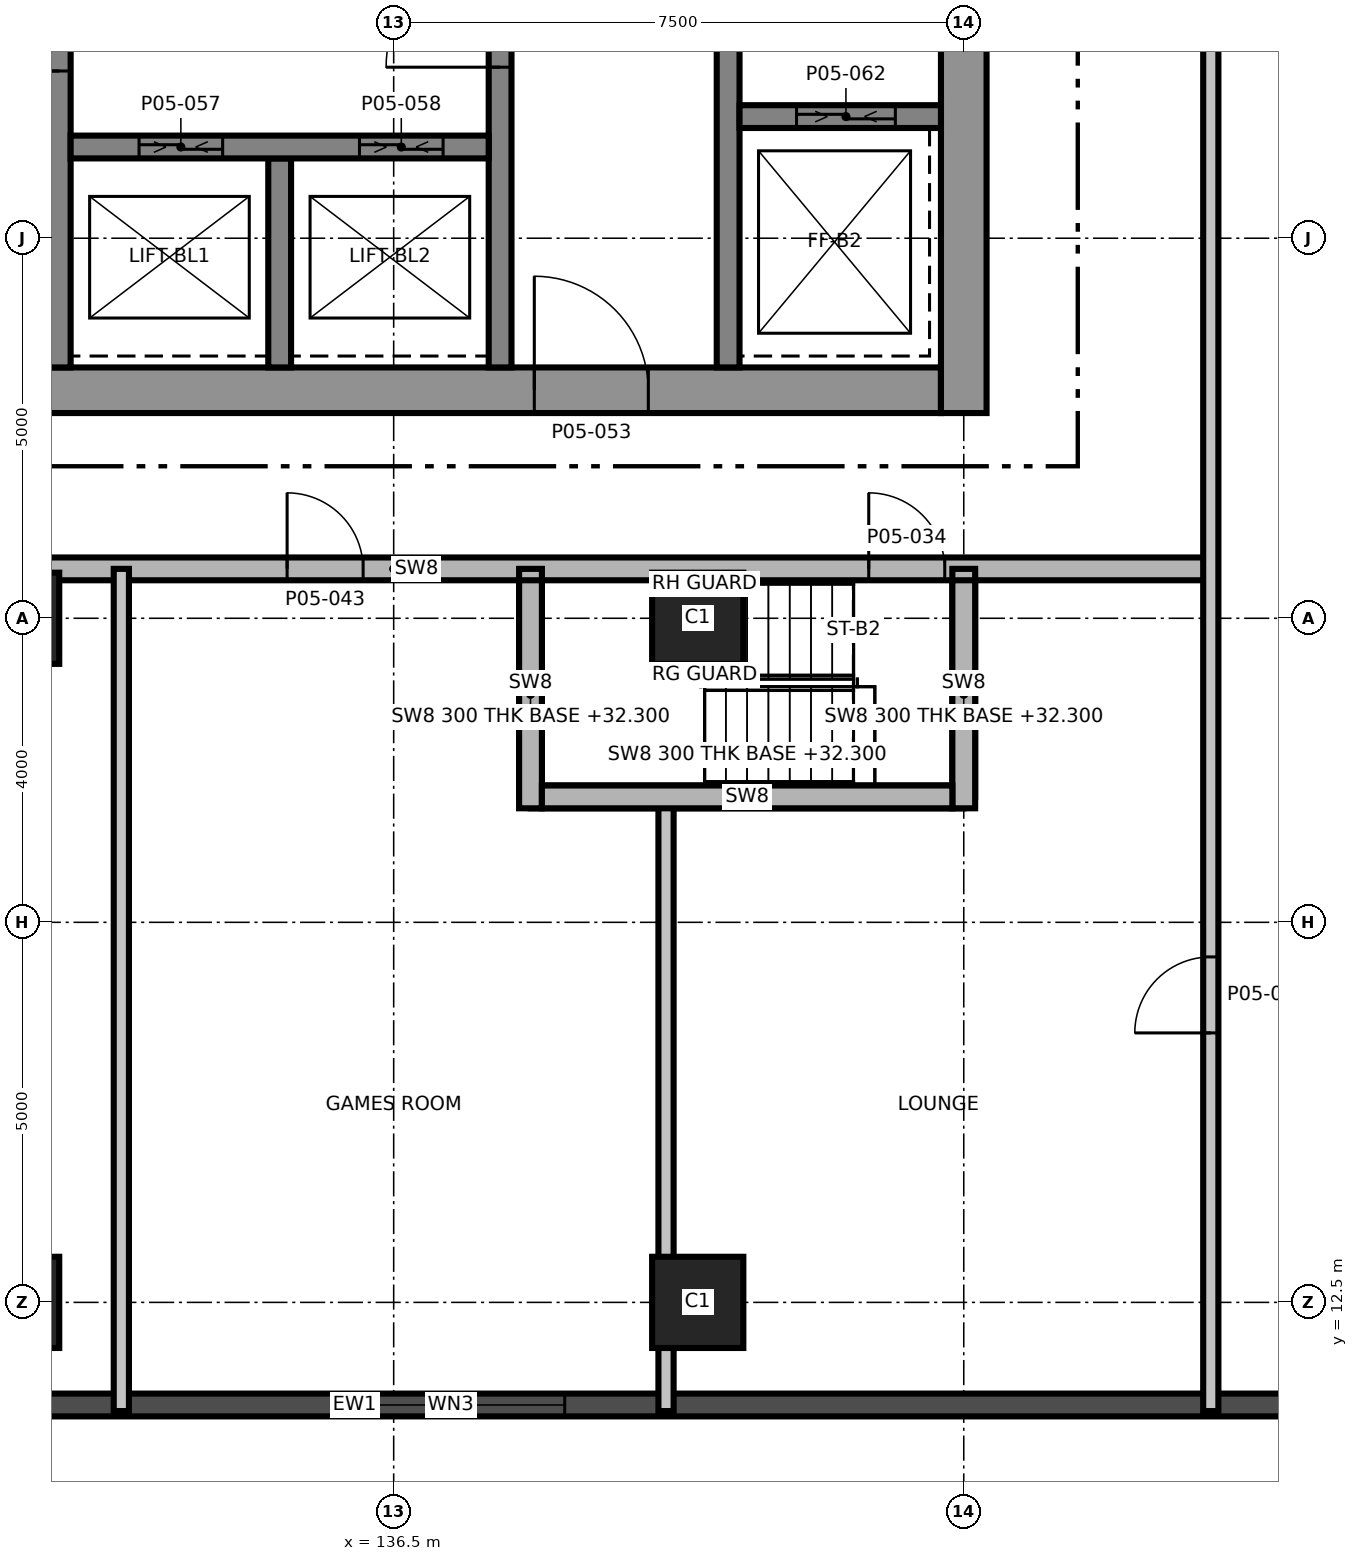
"""IFC4 building model, lengths in metres.
Left out: names, types, materials, properties, quantities, classifications, styles, units other than length and angle.
Written with IfcOpenShell. Run it as: python <this file> out.ifc"""

import sys

from ifc_helpers import new_model, si_unit, direction, frame, frame_2d, origin, origin_2d, place, context, subcontext, project, spatial, rectangle, extrude, element, fill, save


model = new_model("IFC4")
c1 = context("Model", 3, precision=1e-05, world=origin(), true_north=direction((0.0, 1.0)))
c2 = subcontext(c1, "Body", "Model", "MODEL_VIEW")
j1 = project(units=[si_unit("LENGTHUNIT", "METRE"), si_unit("PLANEANGLEUNIT", "RADIAN")], contexts=[c1])
p1 = place(None, origin())
s1 = spatial("IfcSite", under=j1, at=p1, CompositionType="ELEMENT")
p2 = place(p1, origin())
s2 = spatial("IfcBuilding", under=s1, at=p2, CompositionType="ELEMENT")
p3 = place(p2, frame((0.0, 0.0, 28.5)))
s3 = spatial("IfcBuildingStorey", under=s2, at=p3, CompositionType="ELEMENT", Elevation=28.5)
p4 = place(p3, frame((128.7, 24.5, 0.0), z_axis=(0.0, 0.0, 1.0), x_axis=(1.0, 0.0, 0.0)))
e1 = element("IfcWall", 1, at=p4, inside=s3, PredefinedType="SHEAR", context=c2, shape_type="SweptSolid", body=[
    extrude(rectangle(XDim=15.0, YDim=0.6, at=frame_2d((7.5, 0.0))), origin(), (0.0, 0.0, 1.0), 5.0),
])
p5 = place(p4, frame((9.65, 0.0, 0.0)))
e2 = element("IfcOpeningElement", 2, at=p5, cuts=e1, PredefinedType="OPENING", context=c2, shape_type="SweptSolid", body=[
    extrude(rectangle(XDim=1.5, YDim=2.1, at=frame_2d((0.75, 1.05))), frame((0.0, 0.31, 0.0), z_axis=(0.0, -1.0, 0.0), x_axis=(1.0, 0.0, 0.0)), (0.0, 0.0, 1.0), 0.62),
])
p6 = place(p4, frame((1.25, 0.0, 0.0)))
e3 = element("IfcOpeningElement", 3, at=p6, cuts=e1, PredefinedType="OPENING", context=c2, shape_type="SweptSolid", body=[
    extrude(rectangle(XDim=0.9, YDim=2.1, at=frame_2d((0.45, 1.05))), frame((0.0, 0.31, 0.0), z_axis=(0.0, -1.0, 0.0), x_axis=(1.0, 0.0, 0.0)), (0.0, 0.0, 1.0), 0.62),
])
p7 = place(p3, frame((144.0, 24.2, 0.0), z_axis=(0.0, 0.0, 1.0), x_axis=(0.0, 1.0, 0.0)))
e4 = element("IfcWall", 4, at=p7, inside=s3, PredefinedType="SHEAR", context=c2, shape_type="SweptSolid", body=[
    extrude(rectangle(XDim=13.6, YDim=0.6, at=frame_2d((6.8, 0.0))), origin(), (0.0, 0.0, 1.0), 5.0),
])
p8 = place(p3, frame((132.1, 24.8, 0.0), z_axis=(0.0, 0.0, 1.0), x_axis=(0.0, 1.0, 0.0)))
e5 = element("IfcWall", 5, at=p8, inside=s3, PredefinedType="SHEAR", context=c2, shape_type="SweptSolid", body=[
    extrude(rectangle(XDim=12.4, YDim=0.3, at=frame_2d((6.2, 0.0))), origin(), (0.0, 0.0, 1.0), 5.0),
])
p9 = place(p8, frame((3.9, 0.0, 0.0)))
e6 = element("IfcOpeningElement", 6, at=p9, cuts=e5, PredefinedType="OPENING", context=c2, shape_type="SweptSolid", body=[
    extrude(rectangle(XDim=1.2, YDim=2.1, at=frame_2d((0.6, 1.05))), frame((0.0, 0.16, 0.0), z_axis=(0.0, -1.0, 0.0), x_axis=(1.0, 0.0, 0.0)), (0.0, 0.0, 1.0), 0.32),
])
p10 = place(p3, frame((137.9, 24.8, 0.0), z_axis=(0.0, 0.0, 1.0), x_axis=(0.0, 1.0, 0.0)))
e7 = element("IfcWall", 7, at=p10, inside=s3, PredefinedType="SHEAR", context=c2, shape_type="SweptSolid", body=[
    extrude(rectangle(XDim=12.4, YDim=0.3, at=frame_2d((6.2, 0.0))), origin(), (0.0, 0.0, 1.0), 5.0),
])
p11 = place(p10, frame((3.95, 0.0, 0.0)))
e8 = element("IfcOpeningElement", 8, at=p11, cuts=e7, PredefinedType="OPENING", context=c2, shape_type="SweptSolid", body=[
    extrude(rectangle(XDim=1.5, YDim=2.1, at=frame_2d((0.75, 1.05))), frame((0.0, 0.16, 0.0), z_axis=(0.0, -1.0, 0.0), x_axis=(1.0, 0.0, 0.0)), (0.0, 0.0, 1.0), 0.32),
])
p12 = place(p10, frame((10.45, 0.0, 0.0)))
e9 = element("IfcOpeningElement", 9, at=p12, cuts=e7, PredefinedType="OPENING", context=c2, shape_type="SweptSolid", body=[
    extrude(rectangle(XDim=0.9, YDim=2.1, at=frame_2d((0.45, 1.05))), frame((0.0, 0.16, 0.0), z_axis=(0.0, -1.0, 0.0), x_axis=(1.0, 0.0, 0.0)), (0.0, 0.0, 1.0), 0.32),
])
p13 = place(p3, frame((140.9, 24.8, 0.0), z_axis=(0.0, 0.0, 1.0), x_axis=(0.0, 1.0, 0.0)))
e10 = element("IfcWall", 10, at=p13, inside=s3, PredefinedType="SHEAR", context=c2, shape_type="SweptSolid", body=[
    extrude(rectangle(XDim=12.4, YDim=0.3, at=frame_2d((6.2, 0.0))), origin(), (0.0, 0.0, 1.0), 5.0),
])
p14 = place(p13, frame((5.9, 0.0, 0.0)))
e11 = element("IfcOpeningElement", 11, at=p14, cuts=e10, PredefinedType="OPENING", context=c2, shape_type="SweptSolid", body=[
    extrude(rectangle(XDim=1.2, YDim=2.1, at=frame_2d((0.6, 1.05))), frame((0.0, 0.16, 0.0), z_axis=(0.0, -1.0, 0.0), x_axis=(1.0, 0.0, 0.0)), (0.0, 0.0, 1.0), 0.32),
])
p15 = place(p3, frame((135.0, 24.8, 0.0), z_axis=(0.0, 0.0, 1.0), x_axis=(0.0, 1.0, 0.0)))
e12 = element("IfcWall", 12, at=p15, inside=s3, PredefinedType="SHEAR", context=c2, shape_type="SweptSolid", body=[
    extrude(rectangle(XDim=2.75, YDim=0.3, at=frame_2d((1.375, 0.0))), origin(), (0.0, 0.0, 1.0), 5.0),
])
p16 = place(p3, frame((132.25, 27.7, 0.0), z_axis=(0.0, 0.0, 1.0), x_axis=(1.0, 0.0, 0.0)))
e13 = element("IfcWall", 13, at=p16, inside=s3, PredefinedType="SHEAR", context=c2, shape_type="SweptSolid", body=[
    extrude(rectangle(XDim=5.5, YDim=0.3, at=frame_2d((2.75, 0.0))), origin(), (0.0, 0.0, 1.0), 5.0),
])
p17 = place(p16, frame((0.9, 0.0, 0.0)))
e14 = element("IfcOpeningElement", 14, at=p17, cuts=e13, PredefinedType="OPENING", context=c2, shape_type="SweptSolid", body=[
    extrude(rectangle(XDim=1.1, YDim=2.4, at=frame_2d((0.55, 1.2))), frame((0.0, 0.16, 0.0), z_axis=(0.0, -1.0, 0.0), x_axis=(1.0, 0.0, 0.0)), (0.0, 0.0, 1.0), 0.32),
])
p18 = place(p16, frame((3.8, 0.0, 0.0)))
e15 = element("IfcOpeningElement", 15, at=p18, cuts=e13, PredefinedType="OPENING", context=c2, shape_type="SweptSolid", body=[
    extrude(rectangle(XDim=1.1, YDim=2.4, at=frame_2d((0.55, 1.2))), frame((0.0, 0.16, 0.0), z_axis=(0.0, -1.0, 0.0), x_axis=(1.0, 0.0, 0.0)), (0.0, 0.0, 1.0), 0.32),
])
p19 = place(p3, frame((141.05, 28.1, 0.0), z_axis=(0.0, 0.0, 1.0), x_axis=(1.0, 0.0, 0.0)))
e16 = element("IfcWall", 16, at=p19, inside=s3, PredefinedType="SHEAR", context=c2, shape_type="SweptSolid", body=[
    extrude(rectangle(XDim=2.65, YDim=0.3, at=frame_2d((1.325, 0.0))), origin(), (0.0, 0.0, 1.0), 5.0),
])
p20 = place(p19, frame((0.75, 0.0, 0.0)))
e17 = element("IfcOpeningElement", 17, at=p20, cuts=e16, PredefinedType="OPENING", context=c2, shape_type="SweptSolid", body=[
    extrude(rectangle(XDim=1.3, YDim=2.4, at=frame_2d((0.65, 1.2))), frame((0.0, 0.16, 0.0), z_axis=(0.0, -1.0, 0.0), x_axis=(1.0, 0.0, 0.0)), (0.0, 0.0, 1.0), 0.32),
])
for number, where, z_axis, x_axis in (
    (18, (131.5, 12.5, 0.0), (0.0, 0.0, 1.0), (1.0, 0.0, 0.0)),
    (19, (140.5, 12.5, 0.0), (0.0, 0.0, 1.0), (1.0, 0.0, 0.0)),
    (20, (131.5, 21.5, 0.0), (0.0, 0.0, 1.0), (1.0, 0.0, 0.0)),
    (21, (140.5, 21.5, 0.0), (0.0, 0.0, 1.0), (1.0, 0.0, 0.0)),
):
    element("IfcColumn", number, at=place(p3, frame(where, z_axis=z_axis, x_axis=x_axis)), inside=s3, PredefinedType="COLUMN", context=c2, shape_type="SweptSolid", body=[
        extrude(rectangle(XDim=1.2, YDim=1.2, at=origin_2d()), origin(), (0.0, 0.0, 1.0), 5.0),
    ])
p21 = place(p3, frame((118.048, 11.15, 0.0), z_axis=(0.0, 0.0, 1.0), x_axis=(1.0, 0.0, 0.0)))
e22 = element("IfcWall", 22, at=p21, inside=s3, PredefinedType="SOLIDWALL", context=c2, shape_type="SweptSolid", body=[
    extrude(rectangle(XDim=35.88, YDim=0.3, at=frame_2d((17.94, 0.0))), origin(), (0.0, 0.0, 1.0), 4.7),
])
p22 = place(p21, frame((4.202, 0.0, 0.9)))
e23 = element("IfcOpeningElement", 23, at=p22, cuts=e22, PredefinedType="OPENING", context=c2, shape_type="SweptSolid", body=[
    extrude(rectangle(XDim=3.0, YDim=2.4, at=frame_2d((1.5, 1.2))), frame((0.0, 0.16, 0.0), z_axis=(0.0, -1.0, 0.0), x_axis=(1.0, 0.0, 0.0)), (0.0, 0.0, 1.0), 0.32),
])
p23 = place(p21, frame((8.702, 0.0, 0.9)))
e24 = element("IfcOpeningElement", 24, at=p23, cuts=e22, PredefinedType="OPENING", context=c2, shape_type="SweptSolid", body=[
    extrude(rectangle(XDim=3.0, YDim=2.4, at=frame_2d((1.5, 1.2))), frame((0.0, 0.16, 0.0), z_axis=(0.0, -1.0, 0.0), x_axis=(1.0, 0.0, 0.0)), (0.0, 0.0, 1.0), 0.32),
])
p24 = place(p21, frame((17.702, 0.0, 0.9)))
e25 = element("IfcOpeningElement", 25, at=p24, cuts=e22, PredefinedType="OPENING", context=c2, shape_type="SweptSolid", body=[
    extrude(rectangle(XDim=3.0, YDim=2.4, at=frame_2d((1.5, 1.2))), frame((0.0, 0.16, 0.0), z_axis=(0.0, -1.0, 0.0), x_axis=(1.0, 0.0, 0.0)), (0.0, 0.0, 1.0), 0.32),
])
p25 = place(p21, frame((31.726, 0.0, 0.9)))
e26 = element("IfcOpeningElement", 26, at=p25, cuts=e22, PredefinedType="OPENING", context=c2, shape_type="SweptSolid", body=[
    extrude(rectangle(XDim=3.0, YDim=2.4, at=frame_2d((1.5, 1.2))), frame((0.0, 0.16, 0.0), z_axis=(0.0, -1.0, 0.0), x_axis=(1.0, 0.0, 0.0)), (0.0, 0.0, 1.0), 0.32),
])
p26 = place(p3, frame((138.3, 19.15, 0.0), z_axis=(0.0, 0.0, 1.0), x_axis=(1.0, 0.0, 0.0)))
e27 = element("IfcWall", 27, at=p26, inside=s3, PredefinedType="SHEAR", context=c2, shape_type="SweptSolid", body=[
    extrude(rectangle(XDim=5.7, YDim=0.3, at=frame_2d((2.85, 0.0))), origin(), (0.0, 0.0, 1.0), 3.8),
])
p27 = place(p3, frame((125.75, 22.15, 0.0), z_axis=(0.0, 0.0, 1.0), x_axis=(1.0, 0.0, 0.0)))
e28 = element("IfcWall", 28, at=p27, inside=s3, PredefinedType="SHEAR", context=c2, shape_type="SweptSolid", body=[
    extrude(rectangle(XDim=21.5, YDim=0.3, at=frame_2d((10.75, 0.0))), origin(), (0.0, 0.0, 1.0), 3.8),
])
p28 = place(p27, frame((17.0, 0.0, 0.0)))
e29 = element("IfcOpeningElement", 29, at=p28, cuts=e28, PredefinedType="OPENING", context=c2, shape_type="SweptSolid", body=[
    extrude(rectangle(XDim=1.0, YDim=2.1, at=frame_2d((0.5, 1.05))), frame((0.0, 0.16, 0.0), z_axis=(0.0, -1.0, 0.0), x_axis=(1.0, 0.0, 0.0)), (0.0, 0.0, 1.0), 0.32),
])
p29 = place(p27, frame((3.064, 0.0, 0.0)))
e30 = element("IfcOpeningElement", 30, at=p29, cuts=e28, PredefinedType="OPENING", context=c2, shape_type="SweptSolid", body=[
    extrude(rectangle(XDim=1.0, YDim=2.1, at=frame_2d((0.5, 1.05))), frame((0.0, 0.16, 0.0), z_axis=(0.0, -1.0, 0.0), x_axis=(1.0, 0.0, 0.0)), (0.0, 0.0, 1.0), 0.32),
])
p30 = place(p27, frame((9.348, 0.0, 0.0)))
e31 = element("IfcOpeningElement", 31, at=p30, cuts=e28, PredefinedType="OPENING", context=c2, shape_type="SweptSolid", body=[
    extrude(rectangle(XDim=1.0, YDim=2.1, at=frame_2d((0.5, 1.05))), frame((0.0, 0.16, 0.0), z_axis=(0.0, -1.0, 0.0), x_axis=(1.0, 0.0, 0.0)), (0.0, 0.0, 1.0), 0.32),
])
p31 = place(p3, frame((132.917, 11.07, 0.0), z_axis=(0.0, 0.0, 1.0), x_axis=(0.0, 1.0, 0.0)))
e32 = element("IfcWall", 32, at=p31, inside=s3, PredefinedType="PARTITIONING", context=c2, shape_type="SweptSolid", body=[
    extrude(rectangle(XDim=11.08, YDim=0.2, at=frame_2d((5.54, 0.0))), origin(), (0.0, 0.0, 1.0), 3.8),
])
p32 = place(p3, frame((138.3, 19.15, 0.0), z_axis=(0.0, 0.0, 1.0), x_axis=(0.0, 1.0, 0.0)))
e33 = element("IfcWall", 33, at=p32, inside=s3, PredefinedType="SHEAR", context=c2, shape_type="SweptSolid", body=[
    extrude(rectangle(XDim=3.0, YDim=0.3, at=frame_2d((1.5, 0.0))), origin(), (0.0, 0.0, 1.0), 3.8),
])
p33 = place(p3, frame((140.083, 11.07, 0.0), z_axis=(0.0, 0.0, 1.0), x_axis=(0.0, 1.0, 0.0)))
e34 = element("IfcWall", 34, at=p33, inside=s3, PredefinedType="PARTITIONING", context=c2, shape_type="SweptSolid", body=[
    extrude(rectangle(XDim=8.08, YDim=0.2, at=frame_2d((4.04, 0.0))), origin(), (0.0, 0.0, 1.0), 3.8),
])
p34 = place(p3, frame((144.0, 19.15, 0.0), z_axis=(0.0, 0.0, 1.0), x_axis=(0.0, 1.0, 0.0)))
e35 = element("IfcWall", 35, at=p34, inside=s3, PredefinedType="SHEAR", context=c2, shape_type="SweptSolid", body=[
    extrude(rectangle(XDim=3.0, YDim=0.3, at=frame_2d((1.5, 0.0))), origin(), (0.0, 0.0, 1.0), 3.8),
])
p35 = place(p3, frame((147.25, 11.07, 0.0), z_axis=(0.0, 0.0, 1.0), x_axis=(0.0, 1.0, 0.0)))
e36 = element("IfcWall", 36, at=p35, inside=s3, PredefinedType="PARTITIONING", context=c2, shape_type="SweptSolid", body=[
    extrude(rectangle(XDim=38.86, YDim=0.2, at=frame_2d((19.43, 0.0))), origin(), (0.0, 0.0, 1.0), 3.8),
])
p36 = place(p35, frame((18.18, 0.0, 0.0)))
e37 = element("IfcOpeningElement", 37, at=p36, cuts=e36, PredefinedType="OPENING", context=c2, shape_type="SweptSolid", body=[
    extrude(rectangle(XDim=1.5, YDim=2.1, at=frame_2d((0.75, 1.05))), frame((0.0, 0.11, 0.0), z_axis=(0.0, -1.0, 0.0), x_axis=(1.0, 0.0, 0.0)), (0.0, 0.0, 1.0), 0.22),
])
p37 = place(p35, frame((4.975, 0.0, 0.0)))
e38 = element("IfcOpeningElement", 38, at=p37, cuts=e36, PredefinedType="OPENING", context=c2, shape_type="SweptSolid", body=[
    extrude(rectangle(XDim=1.0, YDim=2.1, at=frame_2d((0.5, 1.05))), frame((0.0, 0.11, 0.0), z_axis=(0.0, -1.0, 0.0), x_axis=(1.0, 0.0, 0.0)), (0.0, 0.0, 1.0), 0.22),
])
for number, where, z_axis, x_axis in (
    (39, (138.3, 19.0, 3.8), (0.0, 0.0, 1.0), (0.0, 1.0, 0.0)),
    (40, (144.0, 19.0, 3.8), (0.0, 0.0, 1.0), (0.0, 1.0, 0.0)),
):
    element("IfcWall", number, at=place(p3, frame(where, z_axis=z_axis, x_axis=x_axis)), inside=s3, PredefinedType="SHEAR", context=c2, shape_type="SweptSolid", body=[
        extrude(rectangle(XDim=3.0, YDim=0.3, at=frame_2d((1.5, 0.0))), origin(), (0.0, 0.0, 1.0), 0.9),
    ])
p38 = place(p3, frame((138.45, 19.15, 3.8), z_axis=(0.0, 0.0, 1.0), x_axis=(1.0, 0.0, 0.0)))
e41 = element("IfcWall", 41, at=p38, inside=s3, PredefinedType="SHEAR", context=c2, shape_type="SweptSolid", body=[
    extrude(rectangle(XDim=5.4, YDim=0.3, at=frame_2d((2.7, 0.0))), origin(), (0.0, 0.0, 1.0), 0.9),
])
p39 = place(p24, origin())
e42 = element("IfcWindow", 42, at=p39, inside=s3, PartitioningType="SINGLE_PANEL", PredefinedType="WINDOW", context=c2, shape_type="SweptSolid", body=[
    extrude(rectangle(XDim=3.0, YDim=2.4, at=frame_2d((1.5, 1.2))), frame((0.0, 0.03, 0.0), z_axis=(0.0, -1.0, 0.0), x_axis=(1.0, 0.0, 0.0)), (0.0, 0.0, 1.0), 0.06),
])
fill(e25, e42)
p40 = place(p28, origin())
e43 = element("IfcDoor", 43, at=p40, inside=s3, OperationType="SINGLE_SWING_RIGHT", PredefinedType="DOOR", context=c2, shape_type="SweptSolid", body=[
    extrude(rectangle(XDim=1.0, YDim=2.1, at=frame_2d((0.5, 1.05))), frame((0.0, 0.025, 0.0), z_axis=(0.0, -1.0, 0.0), x_axis=(1.0, 0.0, 0.0)), (0.0, 0.0, 1.0), 0.05),
])
fill(e29, e43)
p41 = place(p30, origin())
e44 = element("IfcDoor", 44, at=p41, inside=s3, OperationType="SINGLE_SWING_LEFT", PredefinedType="DOOR", context=c2, shape_type="SweptSolid", body=[
    extrude(rectangle(XDim=1.0, YDim=2.1, at=frame_2d((0.5, 1.05))), frame((0.0, 0.025, 0.0), z_axis=(0.0, -1.0, 0.0), x_axis=(1.0, 0.0, 0.0)), (0.0, 0.0, 1.0), 0.05),
])
fill(e31, e44)
p42 = place(p37, origin())
e45 = element("IfcDoor", 45, at=p42, inside=s3, OperationType="SINGLE_SWING_RIGHT", PredefinedType="DOOR", context=c2, shape_type="SweptSolid", body=[
    extrude(rectangle(XDim=1.0, YDim=2.1, at=frame_2d((0.5, 1.05))), frame((0.0, 0.025, 0.0), z_axis=(0.0, -1.0, 0.0), x_axis=(1.0, 0.0, 0.0)), (0.0, 0.0, 1.0), 0.05),
])
fill(e38, e45)
p43 = place(p11, origin())
e46 = element("IfcDoor", 46, at=p43, inside=s3, OperationType="SINGLE_SWING_RIGHT", PredefinedType="DOOR", context=c2, shape_type="SweptSolid", body=[
    extrude(rectangle(XDim=1.5, YDim=2.1, at=frame_2d((0.75, 1.05))), frame((0.0, 0.025, 0.0), z_axis=(0.0, -1.0, 0.0), x_axis=(1.0, 0.0, 0.0)), (0.0, 0.0, 1.0), 0.05),
])
fill(e8, e46)
p44 = place(p9, origin())
e47 = element("IfcDoor", 47, at=p44, inside=s3, OperationType="SINGLE_SWING_LEFT", PredefinedType="DOOR", context=c2, shape_type="SweptSolid", body=[
    extrude(rectangle(XDim=1.2, YDim=2.1, at=frame_2d((0.6, 1.05))), frame((0.0, 0.025, 0.0), z_axis=(0.0, -1.0, 0.0), x_axis=(1.0, 0.0, 0.0)), (0.0, 0.0, 1.0), 0.05),
])
fill(e6, e47)
p45 = place(p5, origin())
e48 = element("IfcDoor", 48, at=p45, inside=s3, OperationType="SINGLE_SWING_LEFT", PredefinedType="DOOR", context=c2, shape_type="SweptSolid", body=[
    extrude(rectangle(XDim=1.5, YDim=2.1, at=frame_2d((0.75, 1.05))), frame((0.0, 0.025, 0.0), z_axis=(0.0, -1.0, 0.0), x_axis=(1.0, 0.0, 0.0)), (0.0, 0.0, 1.0), 0.05),
])
fill(e2, e48)
p46 = place(p17, origin())
e49 = element("IfcDoor", 49, at=p46, inside=s3, OperationType="SLIDING_TO_LEFT", PredefinedType="DOOR", context=c2, shape_type="SweptSolid", body=[
    extrude(rectangle(XDim=1.1, YDim=2.4, at=frame_2d((0.55, 1.2))), frame((0.0, 0.025, 0.0), z_axis=(0.0, -1.0, 0.0), x_axis=(1.0, 0.0, 0.0)), (0.0, 0.0, 1.0), 0.05),
])
fill(e14, e49)
p47 = place(p18, origin())
e50 = element("IfcDoor", 50, at=p47, inside=s3, OperationType="SLIDING_TO_LEFT", PredefinedType="DOOR", context=c2, shape_type="SweptSolid", body=[
    extrude(rectangle(XDim=1.1, YDim=2.4, at=frame_2d((0.55, 1.2))), frame((0.0, 0.025, 0.0), z_axis=(0.0, -1.0, 0.0), x_axis=(1.0, 0.0, 0.0)), (0.0, 0.0, 1.0), 0.05),
])
fill(e15, e50)
p48 = place(p20, origin())
e51 = element("IfcDoor", 51, at=p48, inside=s3, OperationType="SLIDING_TO_LEFT", PredefinedType="DOOR", context=c2, shape_type="SweptSolid", body=[
    extrude(rectangle(XDim=1.3, YDim=2.4, at=frame_2d((0.65, 1.2))), frame((0.0, 0.025, 0.0), z_axis=(0.0, -1.0, 0.0), x_axis=(1.0, 0.0, 0.0)), (0.0, 0.0, 1.0), 0.05),
])
fill(e17, e51)
save(model, sys.argv[1])
